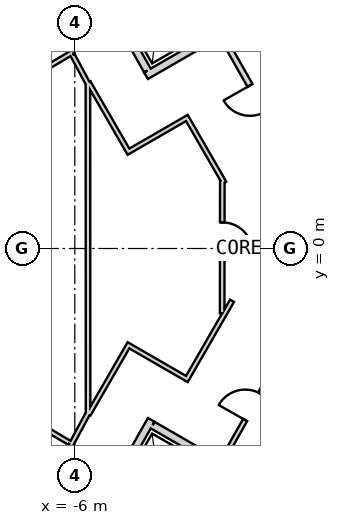
"""IFC4 building model, lengths in metres.
Left out: names, types, materials, properties, quantities, classifications, styles, units other than length and angle.
Written with IfcOpenShell. Run it as: python <this file> out.ifc"""

import sys

from ifc_helpers import new_model, si_unit, direction, frame, frame_2d, origin, place, context, subcontext, project, spatial, rectangle, extrude, element, fill, save


model = new_model("IFC4")
c1 = context("Model", 3, precision=1e-05, world=origin(), true_north=direction((0.0, 1.0)))
c2 = subcontext(c1, "Body", "Model", "MODEL_VIEW")
j1 = project(units=[si_unit("LENGTHUNIT", "METRE"), si_unit("PLANEANGLEUNIT", "RADIAN")], contexts=[c1])
p1 = place(None, origin())
s1 = spatial("IfcSite", under=j1, at=p1, CompositionType="ELEMENT")
p2 = place(p1, origin())
s2 = spatial("IfcBuilding", under=s1, at=p2, CompositionType="ELEMENT")
p3 = place(p2, frame((0.0, 0.0, 298.7)))
s3 = spatial("IfcBuildingStorey", under=s2, at=p3, CompositionType="ELEMENT", Elevation=298.7)
p4 = place(p3, frame((19.475, 2.208, 0.0), z_axis=(0.0, 0.0, 1.0), x_axis=(-0.866028369851, 0.499994862586, 0.0)))
e1 = element("IfcWall", 1, at=p4, inside=s3, PredefinedType="SHEAR", context=c2, shape_type="SweptSolid", body=[
    extrude(rectangle(XDim=31.523, YDim=0.9, at=frame_2d((15.762, 0.0))), origin(), (0.0, 0.0, 1.0), 3.9),
])
p5 = place(p4, frame((7.062, 0.0, 0.0)))
e2 = element("IfcOpeningElement", 2, at=p5, cuts=e1, PredefinedType="OPENING", context=c2, shape_type="SweptSolid", body=[
    extrude(rectangle(XDim=1.2, YDim=2.4, at=frame_2d((0.6, 1.2))), frame((0.0, 0.46, 0.0), z_axis=(0.0, -1.0, 0.0), x_axis=(1.0, 0.0, 0.0)), (0.0, 0.0, 1.0), 0.92),
])
p6 = place(p4, frame((3.612, 0.0, 0.0)))
e3 = element("IfcOpeningElement", 3, at=p6, cuts=e1, PredefinedType="OPENING", context=c2, shape_type="SweptSolid", body=[
    extrude(rectangle(XDim=1.2, YDim=2.4, at=frame_2d((0.6, 1.2))), frame((0.0, 0.46, 0.0), z_axis=(0.0, -1.0, 0.0), x_axis=(1.0, 0.0, 0.0)), (0.0, 0.0, 1.0), 0.92),
])
p7 = place(p4, frame((26.712, 0.0, 0.0)))
e4 = element("IfcOpeningElement", 4, at=p7, cuts=e1, PredefinedType="OPENING", context=c2, shape_type="SweptSolid", body=[
    extrude(rectangle(XDim=1.2, YDim=2.4, at=frame_2d((0.6, 1.2))), frame((0.0, 0.46, 0.0), z_axis=(0.0, -1.0, 0.0), x_axis=(1.0, 0.0, 0.0)), (0.0, 0.0, 1.0), 0.92),
])
p8 = place(p3, frame((-7.825, -17.97, 0.0), z_axis=(0.0, 0.0, 1.0), x_axis=(0.866028369851, 0.499994862586, 0.0)))
e5 = element("IfcWall", 5, at=p8, inside=s3, PredefinedType="SHEAR", context=c2, shape_type="SweptSolid", body=[
    extrude(rectangle(XDim=31.523, YDim=0.9, at=frame_2d((15.762, 0.0))), origin(), (0.0, 0.0, 1.0), 3.9),
])
p9 = place(p8, frame((17.862, 0.0, 0.0)))
e6 = element("IfcOpeningElement", 6, at=p9, cuts=e5, PredefinedType="OPENING", context=c2, shape_type="SweptSolid", body=[
    extrude(rectangle(XDim=1.2, YDim=2.4, at=frame_2d((0.6, 1.2))), frame((0.0, 0.46, 0.0), z_axis=(0.0, -1.0, 0.0), x_axis=(1.0, 0.0, 0.0)), (0.0, 0.0, 1.0), 0.92),
])
p10 = place(p8, frame((20.562, 0.0, 0.0)))
e7 = element("IfcOpeningElement", 7, at=p10, cuts=e5, PredefinedType="OPENING", context=c2, shape_type="SweptSolid", body=[
    extrude(rectangle(XDim=1.2, YDim=2.4, at=frame_2d((0.6, 1.2))), frame((0.0, 0.46, 0.0), z_axis=(0.0, -1.0, 0.0), x_axis=(1.0, 0.0, 0.0)), (0.0, 0.0, 1.0), 0.92),
])
p11 = place(p8, frame((26.712, 0.0, 0.0)))
e8 = element("IfcOpeningElement", 8, at=p11, cuts=e5, PredefinedType="OPENING", context=c2, shape_type="SweptSolid", body=[
    extrude(rectangle(XDim=1.2, YDim=2.4, at=frame_2d((0.6, 1.2))), frame((0.0, 0.46, 0.0), z_axis=(0.0, -1.0, 0.0), x_axis=(1.0, 0.0, 0.0)), (0.0, 0.0, 1.0), 0.92),
])
p12 = place(p8, frame((3.612, 0.0, 0.0)))
e9 = element("IfcOpeningElement", 9, at=p12, cuts=e5, PredefinedType="OPENING", context=c2, shape_type="SweptSolid", body=[
    extrude(rectangle(XDim=1.2, YDim=2.4, at=frame_2d((0.6, 1.2))), frame((0.0, 0.46, 0.0), z_axis=(0.0, -1.0, 0.0), x_axis=(1.0, 0.0, 0.0)), (0.0, 0.0, 1.0), 0.92),
])
p13 = place(p3, frame((-2.108, 5.711, 0.0), z_axis=(0.0, 0.0, 1.0), x_axis=(-0.866009305107, -0.50002788269, 0.0)))
e10 = element("IfcWall", 10, at=p13, inside=s3, PredefinedType="PLUMBINGWALL", context=c2, shape_type="SweptSolid", body=[
    extrude(rectangle(XDim=2.329, YDim=0.2, at=frame_2d((1.165, 0.0))), origin(), (0.0, 0.0, 1.0), 3.6),
])
p14 = place(p3, frame((-5.562, 7.296, 0.0), z_axis=(0.0, 0.0, 1.0), x_axis=(0.49134651263, -0.870964180966, 0.0)))
e11 = element("IfcWall", 11, at=p14, inside=s3, PredefinedType="PLUMBINGWALL", context=c2, shape_type="SweptSolid", body=[
    extrude(rectangle(XDim=3.0, YDim=0.2, at=frame_2d((1.5, 0.0))), origin(), (0.0, 0.0, 1.0), 3.6),
])
p15 = place(p3, frame((-3.99, -4.509, 0.0), z_axis=(0.0, 0.0, 1.0), x_axis=(-0.491358283181, -0.870957540612, 0.0)))
e12 = element("IfcWall", 12, at=p15, inside=s3, PredefinedType="PLUMBINGWALL", context=c2, shape_type="SweptSolid", body=[
    extrude(rectangle(XDim=3.2, YDim=0.2, at=frame_2d((1.6, 0.0))), origin(), (0.0, 0.0, 1.0), 3.6),
])
p16 = place(p3, frame((-3.953, -4.646, 0.0), z_axis=(0.0, 0.0, 1.0), x_axis=(0.866060616833, -0.499939004251, 0.0)))
e13 = element("IfcWall", 13, at=p16, inside=s3, PredefinedType="PLUMBINGWALL", context=c2, shape_type="SweptSolid", body=[
    extrude(rectangle(XDim=2.115, YDim=0.2, at=frame_2d((1.057, 0.0))), origin(), (0.0, 0.0, 1.0), 3.6),
])
p17 = place(p3, frame((-2.124, 5.586, 0.0), z_axis=(0.0, 0.0, 1.0), x_axis=(0.493408695398, -0.869797596746, 0.0)))
e14 = element("IfcWall", 14, at=p17, inside=s3, PredefinedType="PLUMBINGWALL", context=c2, shape_type="SweptSolid", body=[
    extrude(rectangle(XDim=3.778, YDim=0.15, at=frame_2d((1.889, 0.0))), origin(), (0.0, 0.0, 1.0), 3.6),
])
p18 = place(p17, frame((1.489, 0.0, 0.0)))
e15 = element("IfcOpeningElement", 15, at=p18, cuts=e14, PredefinedType="OPENING", context=c2, shape_type="SweptSolid", body=[
    extrude(rectangle(XDim=0.8, YDim=2.1, at=frame_2d((0.4, 1.05))), frame((0.0, 0.085, 0.0), z_axis=(0.0, -1.0, 0.0), x_axis=(1.0, 0.0, 0.0)), (0.0, 0.0, 1.0), 0.17),
])
p19 = place(p3, frame((6.905, -2.679, 0.0), z_axis=(0.0, 0.0, 1.0), x_axis=(-0.937260745886, -0.348629164331, 0.0)))
e16 = element("IfcWall", 16, at=p19, inside=s3, PredefinedType="PARTITIONING", context=c2, shape_type="SweptSolid", body=[
    extrude(rectangle(XDim=9.541, YDim=0.12, at=frame_2d((4.771, 0.0))), origin(), (0.0, 0.0, 1.0), 3.6),
])
p20 = place(p3, frame((-0.466, -2.655, 0.0), z_axis=(0.0, 0.0, 1.0), x_axis=(-0.49235580986, -0.870394023703, 0.0)))
e17 = element("IfcWall", 17, at=p20, inside=s3, PredefinedType="PARTITIONING", context=c2, shape_type="SweptSolid", body=[
    extrude(rectangle(XDim=3.368, YDim=0.12, at=frame_2d((1.684, 0.0))), origin(), (0.0, 0.0, 1.0), 3.6),
])
p21 = place(p20, frame((1.335, 0.0, 0.0)))
e18 = element("IfcOpeningElement", 18, at=p21, cuts=e17, PredefinedType="OPENING", context=c2, shape_type="SweptSolid", body=[
    extrude(rectangle(XDim=0.8, YDim=2.1, at=frame_2d((0.4, 1.05))), frame((0.0, 0.07, 0.0), z_axis=(0.0, -1.0, 0.0), x_axis=(1.0, 0.0, 0.0)), (0.0, 0.0, 1.0), 0.14),
])
p22 = place(p3, frame((-5.651, -4.388, 0.0), z_axis=(0.0, 0.0, 1.0), x_axis=(-0.000472563465, 0.999999888342, 0.0)))
e19 = element("IfcWall", 19, at=p22, inside=s3, PredefinedType="PARTITIONING", context=c2, shape_type="SweptSolid", body=[
    extrude(rectangle(XDim=8.783, YDim=0.12, at=frame_2d((4.391, 0.0))), origin(), (0.0, 0.0, 1.0), 3.6),
])
p23 = place(p3, frame((-6.117, -5.198, 0.0), z_axis=(0.0, 0.0, 1.0), x_axis=(0.473067931341, 0.881025954406, 0.0)))
e20 = element("IfcWall", 20, at=p23, inside=s3, PredefinedType="PARTITIONING", context=c2, shape_type="SweptSolid", body=[
    extrude(rectangle(XDim=1.016, YDim=0.12, at=frame_2d((0.508, 0.0))), origin(), (0.0, 0.0, 1.0), 3.6),
])
p24 = place(p3, frame((-7.95, -4.041, 0.0), z_axis=(0.0, 0.0, 1.0), x_axis=(0.860112457103, -0.510104461004, 0.0)))
e21 = element("IfcWall", 21, at=p24, inside=s3, PredefinedType="PARTITIONING", context=c2, shape_type="SweptSolid", body=[
    extrude(rectangle(XDim=2.104, YDim=0.12, at=frame_2d((1.052, 0.0))), origin(), (0.0, 0.0, 1.0), 3.6),
])
p25 = place(p3, frame((-6.037, 5.176, 0.0), z_axis=(0.0, 0.0, 1.0), x_axis=(-0.860106072674, -0.510115225953, 0.0)))
e22 = element("IfcWall", 22, at=p25, inside=s3, PredefinedType="PARTITIONING", context=c2, shape_type="SweptSolid", body=[
    extrude(rectangle(XDim=2.225, YDim=0.12, at=frame_2d((1.112, 0.0))), origin(), (0.0, 0.0, 1.0), 3.6),
])
p26 = place(p25, frame((0.742, 0.0, 0.0)))
e23 = element("IfcOpeningElement", 23, at=p26, cuts=e22, PredefinedType="OPENING", context=c2, shape_type="SweptSolid", body=[
    extrude(rectangle(XDim=0.8, YDim=2.1, at=frame_2d((0.4, 1.05))), frame((0.0, 0.07, 0.0), z_axis=(0.0, -1.0, 0.0), x_axis=(1.0, 0.0, 0.0)), (0.0, 0.0, 1.0), 0.14),
])
p27 = place(p3, frame((-5.64, 4.31, 0.0), z_axis=(0.0, 0.0, 1.0), x_axis=(-0.472770828932, 0.88118541937, 0.0)))
e24 = element("IfcWall", 24, at=p27, inside=s3, PredefinedType="PARTITIONING", context=c2, shape_type="SweptSolid", body=[
    extrude(rectangle(XDim=0.888, YDim=0.12, at=frame_2d((0.444, 0.0))), origin(), (0.0, 0.0, 1.0), 3.6),
])
p28 = place(p3, frame((-4.558, 2.495, 0.0), z_axis=(0.0, 0.0, 1.0), x_axis=(-0.499986178718, 0.866033383358, 0.0)))
e25 = element("IfcWall", 25, at=p28, inside=s3, PredefinedType="PARTITIONING", context=c2, shape_type="SweptSolid", body=[
    extrude(rectangle(XDim=2.164, YDim=0.12, at=frame_2d((1.082, 0.0))), origin(), (0.0, 0.0, 1.0), 3.6),
])
p29 = place(p3, frame((-2.999, 3.465, 0.0), z_axis=(0.0, 0.0, 1.0), x_axis=(-0.866059624469, -0.499940723351, 0.0)))
e26 = element("IfcWall", 26, at=p29, inside=s3, PredefinedType="PARTITIONING", context=c2, shape_type="SweptSolid", body=[
    extrude(rectangle(XDim=1.775, YDim=0.12, at=frame_2d((0.888, 0.0))), origin(), (0.0, 0.0, 1.0), 3.6),
])
p30 = place(p3, frame((-2.066, 1.729, 0.0), z_axis=(0.0, 0.0, 1.0), x_axis=(-0.500002807145, 0.866023783073, 0.0)))
e27 = element("IfcWall", 27, at=p30, inside=s3, PredefinedType="PARTITIONING", context=c2, shape_type="SweptSolid", body=[
    extrude(rectangle(XDim=1.91, YDim=0.12, at=frame_2d((0.955, 0.0))), origin(), (0.0, 0.0, 1.0), 3.6),
])
p31 = place(p3, frame((-2.122, -1.706, 0.0), z_axis=(0.0, 0.0, 1.0), x_axis=(0.001253480909, 0.999999214392, 0.0)))
e28 = element("IfcWall", 28, at=p31, inside=s3, PredefinedType="PARTITIONING", context=c2, shape_type="SweptSolid", body=[
    extrude(rectangle(XDim=3.506, YDim=0.12, at=frame_2d((1.753, 0.0))), origin(), (0.0, 0.0, 1.0), 3.6),
])
p32 = place(p31, frame((1.594, 0.0, 0.0)))
e29 = element("IfcOpeningElement", 29, at=p32, cuts=e28, PredefinedType="OPENING", context=c2, shape_type="SweptSolid", body=[
    extrude(rectangle(XDim=0.8, YDim=2.1, at=frame_2d((0.4, 1.05))), frame((0.0, 0.07, 0.0), z_axis=(0.0, -1.0, 0.0), x_axis=(1.0, 0.0, 0.0)), (0.0, 0.0, 1.0), 0.14),
])
p33 = place(p3, frame((-3.081, -3.487, 0.0), z_axis=(0.0, 0.0, 1.0), x_axis=(0.499962263673, 0.866047189767, 0.0)))
e30 = element("IfcWall", 30, at=p33, inside=s3, PredefinedType="PARTITIONING", context=c2, shape_type="SweptSolid", body=[
    extrude(rectangle(XDim=2.438, YDim=0.12, at=frame_2d((1.219, 0.0))), origin(), (0.0, 0.0, 1.0), 3.6),
])
p34 = place(p3, frame((-4.64, -2.517, 0.0), z_axis=(0.0, 0.0, 1.0), x_axis=(0.866025242659, -0.500000279077, 0.0)))
e31 = element("IfcWall", 31, at=p34, inside=s3, PredefinedType="PARTITIONING", context=c2, shape_type="SweptSolid", body=[
    extrude(rectangle(XDim=1.775, YDim=0.12, at=frame_2d((0.887, 0.0))), origin(), (0.0, 0.0, 1.0), 3.6),
])
p35 = place(p3, frame((-5.636, -4.362, 0.0), z_axis=(0.0, 0.0, 1.0), x_axis=(0.500099717341, 0.865967824295, 0.0)))
e32 = element("IfcWall", 32, at=p35, inside=s3, PredefinedType="PARTITIONING", context=c2, shape_type="SweptSolid", body=[
    extrude(rectangle(XDim=2.035, YDim=0.12, at=frame_2d((1.018, 0.0))), origin(), (0.0, 0.0, 1.0), 3.6),
])
p36 = place(p18, origin())
e33 = element("IfcDoor", 33, at=p36, inside=s3, OperationType="SINGLE_SWING_RIGHT", PredefinedType="USERDEFINED", context=c2, shape_type="SweptSolid", body=[
    extrude(rectangle(XDim=0.8, YDim=2.1, at=frame_2d((0.4, 1.05))), frame((0.0, 0.025, 0.0), z_axis=(0.0, -1.0, 0.0), x_axis=(1.0, 0.0, 0.0)), (0.0, 0.0, 1.0), 0.05),
])
fill(e15, e33)
p37 = place(p21, origin())
e34 = element("IfcDoor", 34, at=p37, inside=s3, OperationType="SINGLE_SWING_RIGHT", PredefinedType="USERDEFINED", context=c2, shape_type="SweptSolid", body=[
    extrude(rectangle(XDim=0.8, YDim=2.1, at=frame_2d((0.4, 1.05))), frame((0.0, 0.025, 0.0), z_axis=(0.0, -1.0, 0.0), x_axis=(1.0, 0.0, 0.0)), (0.0, 0.0, 1.0), 0.05),
])
fill(e18, e34)
p38 = place(p32, origin())
e35 = element("IfcDoor", 35, at=p38, inside=s3, OperationType="SINGLE_SWING_LEFT", PredefinedType="USERDEFINED", context=c2, shape_type="SweptSolid", body=[
    extrude(rectangle(XDim=0.8, YDim=2.1, at=frame_2d((0.4, 1.05))), frame((0.0, 0.025, 0.0), z_axis=(0.0, -1.0, 0.0), x_axis=(1.0, 0.0, 0.0)), (0.0, 0.0, 1.0), 0.05),
])
fill(e29, e35)
save(model, sys.argv[1])
